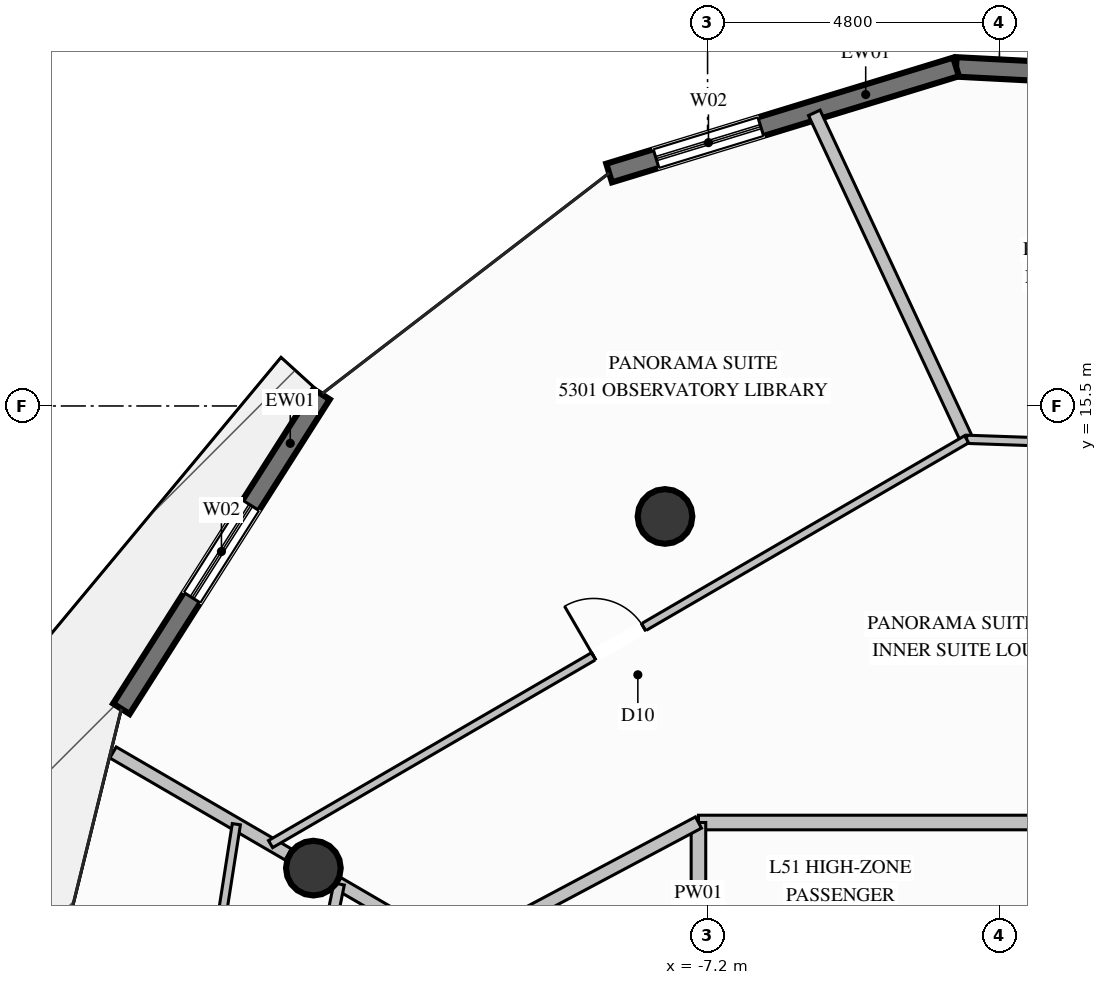
"""IFC4 building model, lengths in metres.
Left out: names, types, materials, properties, quantities, classifications, styles, units other than length and angle.
Written with IfcOpenShell. Run it as: python <this file> out.ifc"""

import sys

from ifc_helpers import new_model, si_unit, direction, frame, frame_2d, origin, origin_2d, place, context, subcontext, project, spatial, rectangle, circle, extrude, element, fill, save


model = new_model("IFC4")
c1 = context("Model", 3, precision=1e-05, world=origin(), true_north=direction((0.0, 1.0)))
c2 = subcontext(c1, "Body", "Model", "MODEL_VIEW")
j1 = project(units=[si_unit("LENGTHUNIT", "METRE"), si_unit("PLANEANGLEUNIT", "RADIAN")], contexts=[c1])
p1 = place(None, origin())
s1 = spatial("IfcSite", under=j1, at=p1, CompositionType="ELEMENT")
p2 = place(p1, origin())
s2 = spatial("IfcBuilding", under=s1, at=p2, CompositionType="ELEMENT")
p3 = place(p2, frame((0.0, 0.0, 198.4)))
s3 = spatial("IfcBuildingStorey", under=s2, at=p3, CompositionType="ELEMENT", Elevation=198.4)
for number, where, z_axis, x_axis in (
    (1, (-7.9, 13.683, 0.0), (0.0, 0.0, 1.0), (1.0, 0.0, 0.0)),
    (2, (-13.683, 7.9, 0.0), (0.0, 0.0, 1.0), (1.0, 0.0, 0.0)),
):
    element("IfcColumn", number, at=place(p3, frame(where, z_axis=z_axis, x_axis=x_axis)), inside=s3, PredefinedType="COLUMN", context=c2, shape_type="SweptSolid", body=[
        extrude(circle(Radius=0.45, at=origin_2d()), origin(), (0.0, 0.0, 1.0), 3.6),
    ])
p4 = place(p3, frame((-3.113, 21.076, 0.0), z_axis=(0.0, 0.0, 1.0), x_axis=(0.998655620393, -0.051835816367, 0.0)))
e3 = element("IfcWall", 3, at=p4, inside=s3, PredefinedType="SOLIDWALL", context=c2, shape_type="SweptSolid", body=[
    extrude(rectangle(XDim=6.132, YDim=0.32, at=frame_2d((3.066, 0.0))), origin(), (0.0, 0.0, 1.0), 3.36),
])
p5 = place(p4, frame((2.166, 0.0, 0.35)))
e4 = element("IfcOpeningElement", 4, at=p5, cuts=e3, PredefinedType="OPENING", context=c2, shape_type="SweptSolid", body=[
    extrude(rectangle(XDim=1.8, YDim=2.6, at=frame_2d((0.9, 1.3))), frame((0.0, 0.17, 0.0), z_axis=(0.0, -1.0, 0.0), x_axis=(1.0, 0.0, 0.0)), (0.0, 0.0, 1.0), 0.34),
])
p6 = place(p3, frame((-8.819, 19.331, 0.0), z_axis=(0.0, 0.0, 1.0), x_axis=(0.956288023308, 0.292426429171, 0.0)))
e5 = element("IfcWall", 5, at=p6, inside=s3, PredefinedType="SOLIDWALL", context=c2, shape_type="SweptSolid", body=[
    extrude(rectangle(XDim=5.967, YDim=0.32, at=frame_2d((2.983, 0.0))), origin(), (0.0, 0.0, 1.0), 3.36),
])
p7 = place(p6, frame((0.808, 0.0, 0.35)))
e6 = element("IfcOpeningElement", 6, at=p7, cuts=e5, PredefinedType="OPENING", context=c2, shape_type="SweptSolid", body=[
    extrude(rectangle(XDim=1.8, YDim=2.6, at=frame_2d((0.9, 1.3))), frame((0.0, 0.17, 0.0), z_axis=(0.0, -1.0, 0.0), x_axis=(1.0, 0.0, 0.0)), (0.0, 0.0, 1.0), 0.34),
])
p8 = place(p3, frame((-16.841, 10.52, 0.0), z_axis=(0.0, 0.0, 1.0), x_axis=(0.536805938934, 0.843705744869, 0.0)))
e7 = element("IfcWall", 7, at=p8, inside=s3, PredefinedType="SOLIDWALL", context=c2, shape_type="SweptSolid", body=[
    extrude(rectangle(XDim=6.133, YDim=0.32, at=frame_2d((3.066, 0.0))), origin(), (0.0, 0.0, 1.0), 3.36),
])
p9 = place(p8, frame((2.166, 0.0, 0.35)))
e8 = element("IfcOpeningElement", 8, at=p9, cuts=e7, PredefinedType="OPENING", context=c2, shape_type="SweptSolid", body=[
    extrude(rectangle(XDim=1.8, YDim=2.6, at=frame_2d((0.9, 1.3))), frame((0.0, 0.17, 0.0), z_axis=(0.0, -1.0, 0.0), x_axis=(1.0, 0.0, 0.0)), (0.0, 0.0, 1.0), 0.34),
])
p10 = place(p3, frame((-7.35, 8.65, 0.0), z_axis=(0.0, 0.0, 1.0), x_axis=(1.0, 0.0, 0.0)))
e9 = element("IfcWall", 9, at=p10, inside=s3, PredefinedType="PARTITIONING", context=c2, shape_type="SweptSolid", body=[
    extrude(rectangle(XDim=13.1, YDim=0.24, at=frame_2d((6.55, 0.0))), origin(), (0.0, 0.0, 1.0), 3.36),
])
p11 = place(p3, frame((-7.35, 4.95, 0.0), z_axis=(0.0, 0.0, 1.0), x_axis=(0.0, 1.0, 0.0)))
e10 = element("IfcWall", 10, at=p11, inside=s3, PredefinedType="PARTITIONING", context=c2, shape_type="SweptSolid", body=[
    extrude(rectangle(XDim=3.7, YDim=0.24, at=frame_2d((1.85, 0.0))), origin(), (0.0, 0.0, 1.0), 2.445),
])
p12 = place(p3, frame((-11.345, 6.525, 0.0), z_axis=(0.0, 0.0, 1.0), x_axis=(-0.864228712324, 0.5030991282, 0.0)))
e11 = element("IfcWall", 11, at=p12, inside=s3, PredefinedType="PARTITIONING", context=c2, shape_type="SweptSolid", body=[
    extrude(rectangle(XDim=2.242, YDim=0.21, at=frame_2d((1.121, 0.0))), origin(), (0.0, 0.0, 1.0), 2.876),
])
p13 = place(p3, frame((-14.096, 8.125, 0.0), z_axis=(0.0, 0.0, 1.0), x_axis=(-0.864328084311, 0.50292838722, 0.0)))
e12 = element("IfcWall", 12, at=p13, inside=s3, PredefinedType="PARTITIONING", context=c2, shape_type="SweptSolid", body=[
    extrude(rectangle(XDim=3.334, YDim=0.21, at=frame_2d((1.667, 0.0))), origin(), (0.0, 0.0, 1.0), 3.36),
])
p14 = place(p3, frame((-11.345, 6.525, 0.0), z_axis=(0.0, 0.0, 1.0), x_axis=(0.882866201619, 0.469624605445, 0.0)))
e13 = element("IfcWall", 13, at=p14, inside=s3, PredefinedType="PARTITIONING", context=c2, shape_type="SweptSolid", body=[
    extrude(rectangle(XDim=4.525, YDim=0.21, at=frame_2d((2.262, 0.0))), origin(), (0.0, 0.0, 1.0), 3.36),
])
p15 = place(p3, frame((-2.94, 14.952, 0.0), z_axis=(0.0, 0.0, 1.0), x_axis=(-0.422820045128, 0.906213666548, 0.0)))
e14 = element("IfcWall", 14, at=p15, inside=s3, PredefinedType="PARTITIONING", context=c2, shape_type="SweptSolid", body=[
    extrude(rectangle(XDim=5.925, YDim=0.21, at=frame_2d((2.962, 0.0))), origin(), (0.0, 0.0, 1.0), 3.36),
])
p16 = place(p3, frame((-2.94, 14.952, 0.0), z_axis=(0.0, 0.0, 1.0), x_axis=(0.999399675895, -0.034645170236, 0.0)))
e15 = element("IfcWall", 15, at=p16, inside=s3, PredefinedType="PARTITIONING", context=c2, shape_type="SweptSolid", body=[
    extrude(rectangle(XDim=11.402, YDim=0.135, at=frame_2d((5.701, 0.0))), origin(), (0.0, 0.0, 1.0), 2.929),
])
p17 = place(p16, frame((5.226, 0.0, 0.0)))
e16 = element("IfcOpeningElement", 16, at=p17, cuts=e15, PredefinedType="OPENING", context=c2, shape_type="SweptSolid", body=[
    extrude(rectangle(XDim=0.95, YDim=2.1, at=frame_2d((0.475, 1.05))), frame((0.0, 0.078, 0.0), z_axis=(0.0, -1.0, 0.0), x_axis=(1.0, 0.0, 0.0)), (0.0, 0.0, 1.0), 0.155),
])
p18 = place(p3, frame((-14.387, 8.295, 0.0), z_axis=(0.0, 0.0, 1.0), x_axis=(0.864450171357, 0.502718510939, 0.0)))
e17 = element("IfcWall", 17, at=p18, inside=s3, PredefinedType="PARTITIONING", context=c2, shape_type="SweptSolid", body=[
    extrude(rectangle(XDim=13.242, YDim=0.135, at=frame_2d((6.621, 0.0))), origin(), (0.0, 0.0, 1.0), 2.929),
])
p19 = place(p18, frame((6.146, 0.0, 0.0)))
e18 = element("IfcOpeningElement", 18, at=p19, cuts=e17, PredefinedType="OPENING", context=c2, shape_type="SweptSolid", body=[
    extrude(rectangle(XDim=0.95, YDim=2.1, at=frame_2d((0.475, 1.05))), frame((0.0, 0.078, 0.0), z_axis=(0.0, -1.0, 0.0), x_axis=(1.0, 0.0, 0.0)), (0.0, 0.0, 1.0), 0.155),
])
p20 = place(p3, frame((-13.26, 7.639, 0.0), z_axis=(0.0, 0.0, 1.0), x_axis=(-0.200141353017, -0.979767032928, 0.0)))
e19 = element("IfcWall", 19, at=p20, inside=s3, PredefinedType="PLUMBINGWALL", context=c2, shape_type="SweptSolid", body=[
    extrude(rectangle(XDim=3.218, YDim=0.175, at=frame_2d((1.609, 0.0))), origin(), (0.0, 0.0, 1.0), 2.929),
])
p21 = place(p3, frame((-14.95, 8.622, 0.0), z_axis=(0.0, 0.0, 1.0), x_axis=(-0.154734004618, -0.98795616695, 0.0)))
e20 = element("IfcWall", 20, at=p21, inside=s3, PredefinedType="PARTITIONING", context=c2, shape_type="SweptSolid", body=[
    extrude(rectangle(XDim=8.654, YDim=0.135, at=frame_2d((4.327, 0.0))), origin(), (0.0, 0.0, 1.0), 2.929),
])
p22 = place(p21, frame((3.852, 0.0, 0.0)))
e21 = element("IfcOpeningElement", 21, at=p22, cuts=e20, PredefinedType="OPENING", context=c2, shape_type="SweptSolid", body=[
    extrude(rectangle(XDim=0.95, YDim=2.1, at=frame_2d((0.475, 1.05))), frame((0.0, 0.078, 0.0), z_axis=(0.0, -1.0, 0.0), x_axis=(1.0, 0.0, 0.0)), (0.0, 0.0, 1.0), 0.155),
])
p23 = place(p7, origin())
e22 = element("IfcWindow", 22, at=p23, inside=s3, PartitioningType="SINGLE_PANEL", PredefinedType="WINDOW", context=c2, shape_type="SweptSolid", body=[
    extrude(rectangle(XDim=1.8, YDim=2.6, at=frame_2d((0.9, 1.3))), frame((0.0, 0.03, 0.0), z_axis=(0.0, -1.0, 0.0), x_axis=(1.0, 0.0, 0.0)), (0.0, 0.0, 1.0), 0.06),
])
fill(e6, e22)
p24 = place(p9, origin())
e23 = element("IfcWindow", 23, at=p24, inside=s3, PartitioningType="SINGLE_PANEL", PredefinedType="WINDOW", context=c2, shape_type="SweptSolid", body=[
    extrude(rectangle(XDim=1.8, YDim=2.6, at=frame_2d((0.9, 1.3))), frame((0.0, 0.03, 0.0), z_axis=(0.0, -1.0, 0.0), x_axis=(1.0, 0.0, 0.0)), (0.0, 0.0, 1.0), 0.06),
])
fill(e8, e23)
p25 = place(p19, origin())
e24 = element("IfcDoor", 24, at=p25, inside=s3, OperationType="SINGLE_SWING_LEFT", PredefinedType="DOOR", context=c2, shape_type="SweptSolid", body=[
    extrude(rectangle(XDim=0.95, YDim=2.1, at=frame_2d((0.475, 1.05))), frame((0.0, 0.025, 0.0), z_axis=(0.0, -1.0, 0.0), x_axis=(1.0, 0.0, 0.0)), (0.0, 0.0, 1.0), 0.05),
])
fill(e18, e24)
save(model, sys.argv[1])
